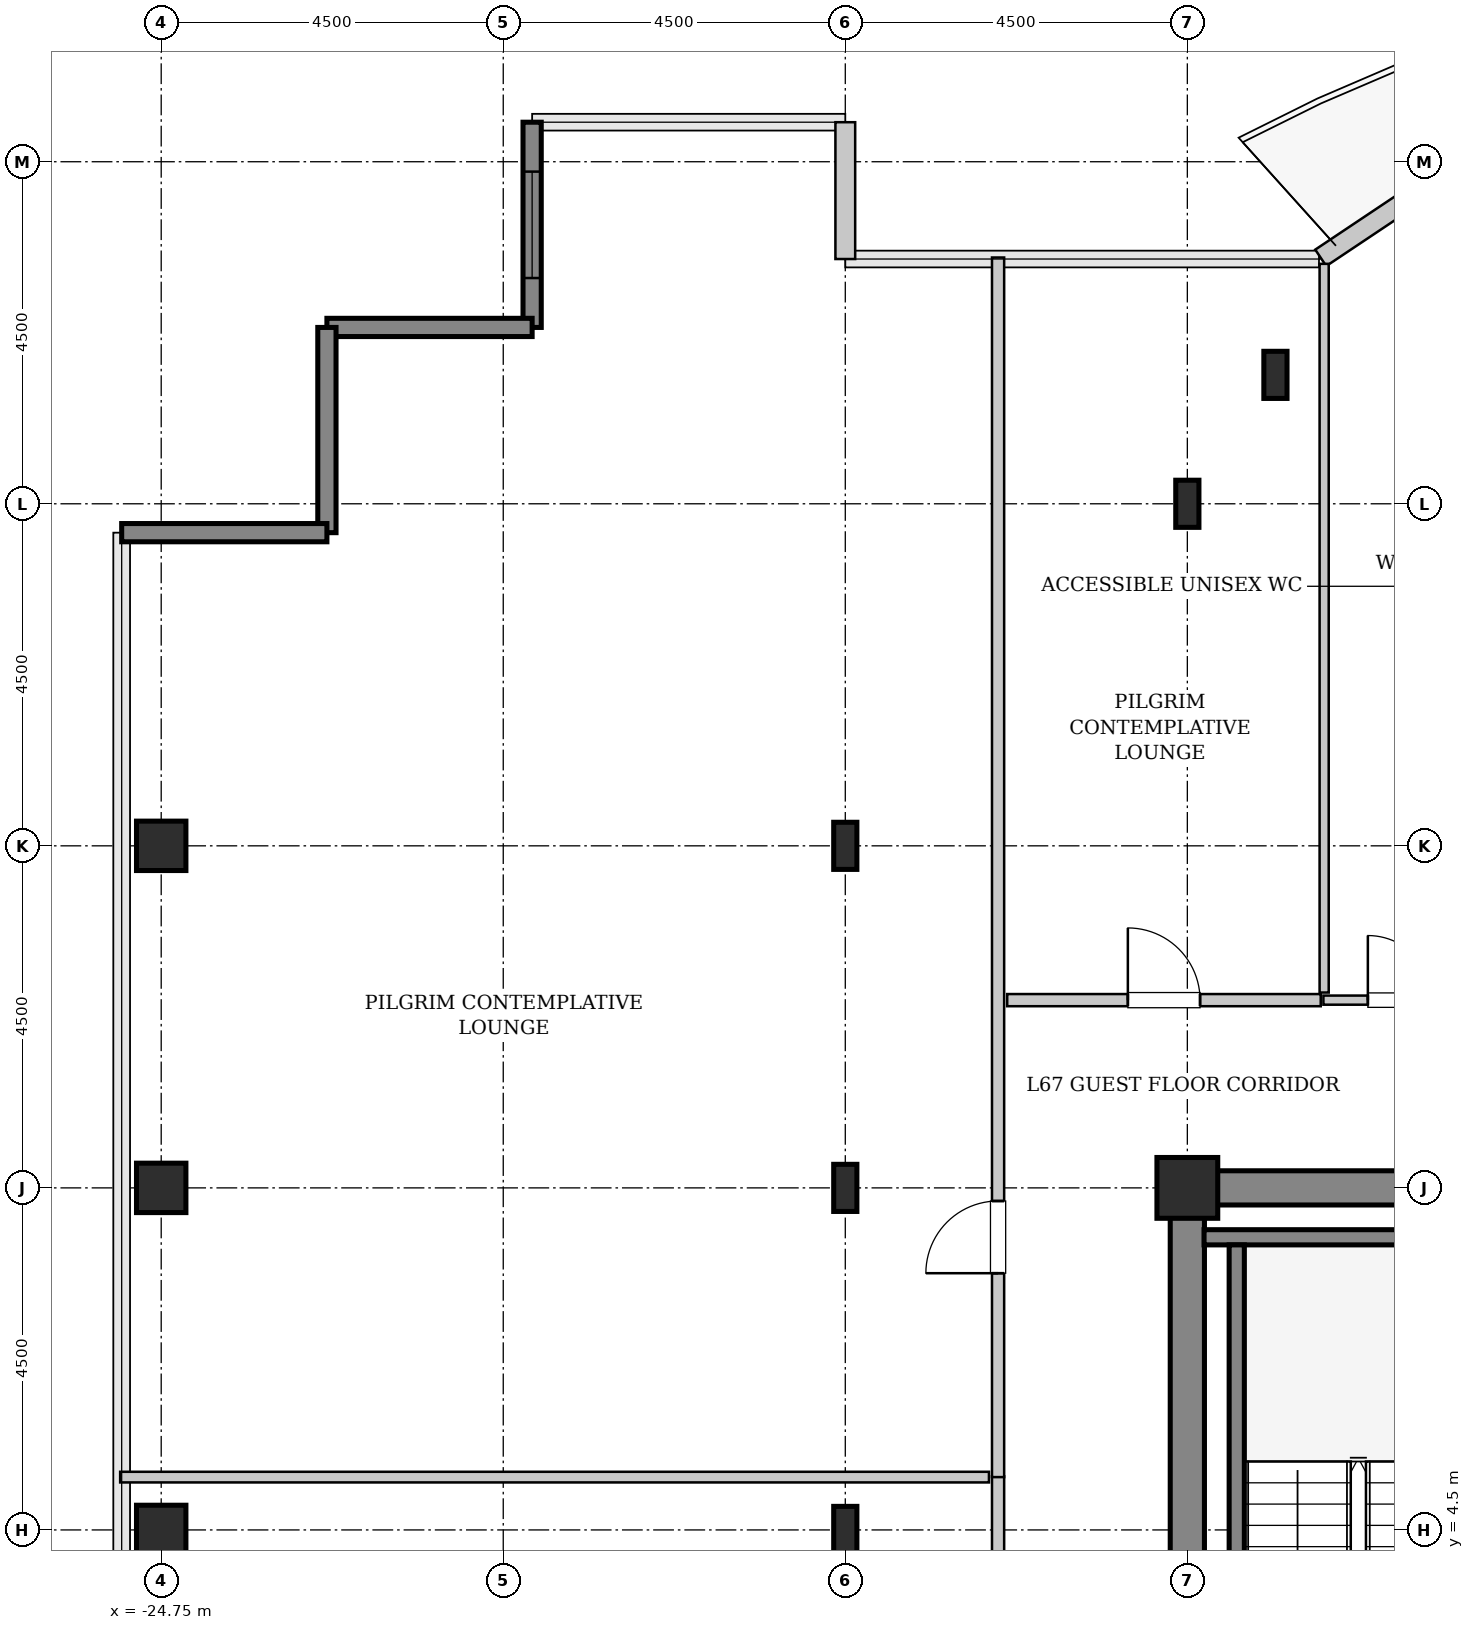
"""IFC4 building model, lengths in metres.
Left out: names, types, materials, properties, quantities, classifications, styles, units other than length and angle.
Written with IfcOpenShell. Run it as: python <this file> out.ifc"""

import sys

from ifc_helpers import new_model, si_unit, direction, frame, frame_2d, origin, origin_2d, place, context, subcontext, project, spatial, rectangle, hollow_rectangle, i_section, extrude, source, transform, mapped, element, fill, save


model = new_model("IFC4")
c1 = context("Model", 3, precision=1e-05, world=origin(), true_north=direction((0.0, 1.0)))
c2 = subcontext(c1, "Body", "Model", "MODEL_VIEW")
j1 = project(units=[si_unit("LENGTHUNIT", "METRE"), si_unit("PLANEANGLEUNIT", "RADIAN")], contexts=[c1])
p1 = place(None, origin())
s1 = spatial("IfcSite", under=j1, at=p1, CompositionType="ELEMENT")
p2 = place(p1, origin())
s2 = spatial("IfcBuilding", under=s1, at=p2, CompositionType="ELEMENT")
p3 = place(p2, frame((0.0, 0.0, 268.4)))
s3 = spatial("IfcBuildingStorey", under=s2, at=p3, CompositionType="ELEMENT", Elevation=268.4)
m1 = source(origin(), c2, "Body", "SweptSolid", [
    extrude(rectangle(XDim=9.925, YDim=0.45, at=frame_2d((4.962, 0.0))), origin(), (0.0, 0.0, 1.0), 3.8),
])
p4 = place(p3, frame((-11.475, 9.0, 0.0), z_axis=(0.0, 0.0, 1.0), x_axis=(1.0, 0.0, 0.0)))
e1 = element("IfcWall", 1, at=p4, inside=s3, PredefinedType="SHEAR", context=c2, shape_type="MappedRepresentation", body=[
    mapped(m1, transform((0.0, 0.0, 0.0), x_axis=(1.0, 0.0, 0.0), y_axis=(0.0, 1.0, 0.0), z_axis=(0.0, 0.0, 1.0), scale=1.0)),
])
m2 = source(origin(), c2, "Body", "SweptSolid", [
    extrude(rectangle(XDim=7.425, YDim=0.45, at=frame_2d((3.712, 0.0))), origin(), (0.0, 0.0, 1.0), 3.8),
])
p5 = place(p3, frame((-11.25, 1.35, 0.0), z_axis=(0.0, 0.0, 1.0), x_axis=(0.0, 1.0, 0.0)))
e2 = element("IfcWall", 2, at=p5, inside=s3, PredefinedType="SHEAR", context=c2, shape_type="MappedRepresentation", body=[
    mapped(m2, transform((0.0, 0.0, 0.0), x_axis=(1.0, 0.0, 0.0), y_axis=(0.0, 1.0, 0.0), z_axis=(0.0, 0.0, 1.0), scale=1.0)),
])
m3 = source(origin(), c2, "Body", "SweptSolid", [
    extrude(hollow_rectangle(XDim=0.65, YDim=0.65, WallThickness=0.032, InnerFilletRadius=0.032, OuterFilletRadius=0.064, at=origin_2d()), origin(), (0.0, 0.0, 1.0), 3.8),
])
for number, where, z_axis, x_axis in (
    (3, (-24.75, 4.5, 0.0), (0.0, 0.0, 1.0), (1.0, 0.0, 0.0)),
    (4, (-24.75, 9.0, 0.0), (0.0, 0.0, 1.0), (1.0, 0.0, 0.0)),
    (5, (-24.75, 13.5, 0.0), (0.0, 0.0, 1.0), (1.0, 0.0, 0.0)),
):
    element("IfcColumn", number, at=place(p3, frame(where, z_axis=z_axis, x_axis=x_axis)), inside=s3, PredefinedType="COLUMN", context=c2, shape_type="MappedRepresentation", body=[
        mapped(m3, transform((0.0, 0.0, 0.0), x_axis=(1.0, 0.0, 0.0), y_axis=(0.0, 1.0, 0.0), z_axis=(0.0, 0.0, 1.0), scale=1.0)),
    ])
m4 = source(origin(), c2, "Body", "SweptSolid", [
    extrude(i_section(OverallWidth=0.305, OverallDepth=0.62, WebThickness=0.021, FlangeThickness=0.04, FilletRadius=0.027, at=origin_2d()), origin(), (0.0, 0.0, 1.0), 3.8),
])
for number, where, z_axis, x_axis in (
    (6, (-15.75, 4.5, 0.0), (0.0, 0.0, 1.0), (1.0, 0.0, 0.0)),
    (7, (-15.75, 9.0, 0.0), (0.0, 0.0, 1.0), (1.0, 0.0, 0.0)),
    (8, (-15.75, 13.5, 0.0), (0.0, 0.0, 1.0), (1.0, 0.0, 0.0)),
):
    element("IfcColumn", number, at=place(p3, frame(where, z_axis=z_axis, x_axis=x_axis)), inside=s3, PredefinedType="COLUMN", context=c2, shape_type="MappedRepresentation", body=[
        mapped(m4, transform((0.0, 0.0, 0.0), x_axis=(1.0, 0.0, 0.0), y_axis=(0.0, 1.0, 0.0), z_axis=(0.0, 0.0, 1.0), scale=1.0)),
    ])
m5 = source(origin(), c2, "Body", "SweptSolid", [
    extrude(hollow_rectangle(XDim=0.8, YDim=0.8, WallThickness=0.04, InnerFilletRadius=0.04, OuterFilletRadius=0.08, at=origin_2d()), origin(), (0.0, 0.0, 1.0), 3.8),
])
p6 = place(p3, frame((-11.25, 9.0, 0.0), z_axis=(0.0, 0.0, 1.0), x_axis=(1.0, 0.0, 0.0)))
e9 = element("IfcColumn", 9, at=p6, inside=s3, PredefinedType="COLUMN", context=c2, shape_type="MappedRepresentation", body=[
    mapped(m5, transform((0.0, 0.0, 0.0), x_axis=(1.0, 0.0, 0.0), y_axis=(0.0, 1.0, 0.0), z_axis=(0.0, 0.0, 1.0), scale=1.0)),
])
for number, where, z_axis, x_axis in (
    (10, (-11.25, 18.0, 0.0), (0.0, 0.0, 1.0), (1.0, 0.0, 0.0)),
    (11, (-10.091, 19.696, 0.0), (0.0, 0.0, 1.0), (1.0, 0.0, 0.0)),
):
    element("IfcColumn", number, at=place(p3, frame(where, z_axis=z_axis, x_axis=x_axis)), inside=s3, PredefinedType="COLUMN", context=c2, shape_type="MappedRepresentation", body=[
        mapped(m4, transform((0.0, 0.0, 0.0), x_axis=(1.0, 0.0, 0.0), y_axis=(0.0, 1.0, 0.0), z_axis=(0.0, 0.0, 1.0), scale=1.0)),
    ])
m6 = source(origin(), c2, "Body", "SweptSolid", [
    extrude(rectangle(XDim=1.469, YDim=0.26, at=frame_2d((0.734, 0.0))), origin(), (0.0, 0.0, 1.0), 3.55),
])
p7 = place(p3, frame((-8.273, 22.052, 0.0), z_axis=(0.0, 0.0, 1.0), x_axis=(-0.831461760506, -0.555581983884, 0.0)))
e12 = element("IfcWall", 12, at=p7, inside=s3, PredefinedType="SOLIDWALL", context=c2, shape_type="MappedRepresentation", body=[
    mapped(m6, transform((0.0, 0.0, 0.0), x_axis=(1.0, 0.0, 0.0), y_axis=(0.0, 1.0, 0.0), z_axis=(0.0, 0.0, 1.0), scale=1.0)),
])
m7 = source(origin(), c2, "Body", "SweptSolid", [
    extrude(rectangle(XDim=1.8, YDim=0.26, at=frame_2d((0.9, 0.0))), origin(), (0.0, 0.0, 1.0), 3.55),
])
p8 = place(p3, frame((-15.75, 21.22, 0.0), z_axis=(0.0, 0.0, 1.0), x_axis=(0.0, 1.0, 0.0)))
e13 = element("IfcWall", 13, at=p8, inside=s3, PredefinedType="SOLIDWALL", context=c2, shape_type="MappedRepresentation", body=[
    mapped(m7, transform((0.0, 0.0, 0.0), x_axis=(1.0, 0.0, 0.0), y_axis=(0.0, 1.0, 0.0), z_axis=(0.0, 0.0, 1.0), scale=1.0)),
])
m8 = source(origin(), c2, "Body", "SweptSolid", [
    extrude(rectangle(XDim=2.7, YDim=0.24, at=frame_2d((1.35, 0.0))), origin(), (0.0, 0.0, 1.0), 3.55),
])
p9 = place(p3, frame((-19.87, 23.02, 0.0), z_axis=(0.0, 0.0, 1.0), x_axis=(0.0, -1.0, 0.0)))
e14 = element("IfcWall", 14, at=p9, inside=s3, PredefinedType="SHEAR", context=c2, shape_type="MappedRepresentation", body=[
    mapped(m8, transform((0.0, 0.0, 0.0), x_axis=(1.0, 0.0, 0.0), y_axis=(0.0, 1.0, 0.0), z_axis=(0.0, 0.0, 1.0), scale=1.0)),
])
p10 = place(p9, frame((0.65, 0.0, 0.85)))
e15 = element("IfcOpeningElement", 15, at=p10, cuts=e14, PredefinedType="OPENING", context=c2, shape_type="SweptSolid", body=[
    extrude(rectangle(XDim=1.4, YDim=1.8, at=frame_2d((0.7, 0.9))), frame((0.0, 0.13, 0.0), z_axis=(0.0, -1.0, 0.0), x_axis=(1.0, 0.0, 0.0)), (0.0, 0.0, 1.0), 0.26),
])
for number, where, z_axis, x_axis in (
    (16, (-19.87, 20.32, 0.0), (0.0, 0.0, 1.0), (-1.0, 0.0, 0.0)),
    (17, (-22.57, 20.32, 0.0), (0.0, 0.0, 1.0), (0.0, -1.0, 0.0)),
    (18, (-22.57, 17.62, 0.0), (0.0, 0.0, 1.0), (-1.0, 0.0, 0.0)),
):
    element("IfcWall", number, at=place(p3, frame(where, z_axis=z_axis, x_axis=x_axis)), inside=s3, PredefinedType="SHEAR", context=c2, shape_type="MappedRepresentation", body=[
        mapped(m8, transform((0.0, 0.0, 0.0), x_axis=(1.0, 0.0, 0.0), y_axis=(0.0, 1.0, 0.0), z_axis=(0.0, 0.0, 1.0), scale=1.0)),
    ])
m9 = source(origin(), c2, "Body", "SweptSolid", [
    extrude(rectangle(XDim=3.73, YDim=0.2, at=frame_2d((1.865, 0.0))), origin(), (0.0, 0.0, 1.0), 3.8),
])
p11 = place(p3, frame((-7.3, 8.35, 0.0), z_axis=(0.0, 0.0, 1.0), x_axis=(-1.0, 0.0, 0.0)))
e19 = element("IfcWall", 19, at=p11, inside=s3, PredefinedType="SOLIDWALL", context=c2, shape_type="MappedRepresentation", body=[
    mapped(m9, transform((0.0, 0.0, 0.0), x_axis=(1.0, 0.0, 0.0), y_axis=(0.0, 1.0, 0.0), z_axis=(0.0, 0.0, 1.0), scale=1.0)),
])
m10 = source(origin(), c2, "Body", "SweptSolid", [
    extrude(rectangle(XDim=7.1, YDim=0.2, at=frame_2d((3.55, 0.0))), origin(), (0.0, 0.0, 1.0), 3.8),
])
p12 = place(p3, frame((-10.6, 1.15, 0.0), z_axis=(0.0, 0.0, 1.0), x_axis=(0.0, 1.0, 0.0)))
e20 = element("IfcWall", 20, at=p12, inside=s3, PredefinedType="SOLIDWALL", context=c2, shape_type="MappedRepresentation", body=[
    mapped(m10, transform((0.0, 0.0, 0.0), x_axis=(1.0, 0.0, 0.0), y_axis=(0.0, 1.0, 0.0), z_axis=(0.0, 0.0, 1.0), scale=1.0)),
])
m11 = source(origin(), c2, "Body", "SweptSolid", [
    extrude(rectangle(XDim=2.02, YDim=0.12, at=frame_2d((1.01, 0.0))), origin(), (0.0, 0.0, 1.0), 3.535),
])
p13 = place(p3, frame((-9.46, 11.47, 0.0), z_axis=(0.0, 0.0, 1.0), x_axis=(1.0, 0.0, 0.0)))
e21 = element("IfcWall", 21, at=p13, inside=s3, PredefinedType="PLUMBINGWALL", context=c2, shape_type="MappedRepresentation", body=[
    mapped(m11, transform((0.0, 0.0, 0.0), x_axis=(1.0, 0.0, 0.0), y_axis=(0.0, 1.0, 0.0), z_axis=(0.0, 0.0, 1.0), scale=1.0)),
])
p14 = place(p13, frame((0.585, 0.0, 0.0)))
e22 = element("IfcOpeningElement", 22, at=p14, cuts=e21, PredefinedType="OPENING", context=c2, shape_type="SweptSolid", body=[
    extrude(rectangle(XDim=0.85, YDim=2.1, at=frame_2d((0.425, 1.05))), frame((0.0, 0.07, 0.0), z_axis=(0.0, -1.0, 0.0), x_axis=(1.0, 0.0, 0.0)), (0.0, 0.0, 1.0), 0.14),
])
m12 = source(origin(), c2, "Body", "SweptSolid", [
    extrude(rectangle(XDim=9.587, YDim=0.12, at=frame_2d((4.793, 0.0))), origin(), (0.0, 0.0, 1.0), 3.535),
])
p15 = place(p3, frame((-9.45, 11.57, 0.0), z_axis=(0.0, 0.0, 1.0), x_axis=(0.0, 1.0, 0.0)))
e23 = element("IfcWall", 23, at=p15, inside=s3, PredefinedType="PLUMBINGWALL", context=c2, shape_type="MappedRepresentation", body=[
    mapped(m12, transform((0.0, 0.0, 0.0), x_axis=(1.0, 0.0, 0.0), y_axis=(0.0, 1.0, 0.0), z_axis=(0.0, 0.0, 1.0), scale=1.0)),
])
m13 = source(origin(), c2, "Body", "SweptSolid", [
    extrude(rectangle(XDim=6.705, YDim=0.16, at=frame_2d((3.353, 0.0))), origin(), (0.0, 0.0, 1.0), 3.535),
])
p16 = place(p3, frame((-13.74, -1.5, 0.0), z_axis=(0.0, 0.0, 1.0), x_axis=(0.0, 1.0, 0.0)))
e24 = element("IfcWall", 24, at=p16, inside=s3, PredefinedType="PARTITIONING", context=c2, shape_type="MappedRepresentation", body=[
    mapped(m13, transform((0.0, 0.0, 0.0), x_axis=(1.0, 0.0, 0.0), y_axis=(0.0, 1.0, 0.0), z_axis=(0.0, 0.0, 1.0), scale=1.0)),
])
p17 = place(p16, frame((2.877, 0.0, 0.0)))
e25 = element("IfcOpeningElement", 25, at=p17, cuts=e24, PredefinedType="OPENING", context=c2, shape_type="SweptSolid", body=[
    extrude(rectangle(XDim=0.95, YDim=2.1, at=frame_2d((0.475, 1.05))), frame((0.0, 0.09, 0.0), z_axis=(0.0, -1.0, 0.0), x_axis=(1.0, 0.0, 0.0)), (0.0, 0.0, 1.0), 0.18),
])
m14 = source(origin(), c2, "Body", "SweptSolid", [
    extrude(rectangle(XDim=11.43, YDim=0.14, at=frame_2d((5.715, 0.0))), origin(), (0.0, 0.0, 1.0), 3.535),
])
p18 = place(p3, frame((-25.29, 5.195, 0.0), z_axis=(0.0, 0.0, 1.0), x_axis=(1.0, 0.0, 0.0)))
e26 = element("IfcWall", 26, at=p18, inside=s3, PredefinedType="PARTITIONING", context=c2, shape_type="MappedRepresentation", body=[
    mapped(m14, transform((0.0, 0.0, 0.0), x_axis=(1.0, 0.0, 0.0), y_axis=(0.0, 1.0, 0.0), z_axis=(0.0, 0.0, 1.0), scale=1.0)),
])
m15 = source(origin(), c2, "Body", "SweptSolid", [
    extrude(rectangle(XDim=16.045, YDim=0.16, at=frame_2d((8.022, 0.0))), origin(), (0.0, 0.0, 1.0), 3.535),
])
p19 = place(p3, frame((-13.74, 5.195, 0.0), z_axis=(0.0, 0.0, 1.0), x_axis=(0.0, 1.0, 0.0)))
e27 = element("IfcWall", 27, at=p19, inside=s3, PredefinedType="PARTITIONING", context=c2, shape_type="MappedRepresentation", body=[
    mapped(m15, transform((0.0, 0.0, 0.0), x_axis=(1.0, 0.0, 0.0), y_axis=(0.0, 1.0, 0.0), z_axis=(0.0, 0.0, 1.0), scale=1.0)),
])
p20 = place(p19, frame((2.683, 0.0, 0.0)))
e28 = element("IfcOpeningElement", 28, at=p20, cuts=e27, PredefinedType="OPENING", context=c2, shape_type="SweptSolid", body=[
    extrude(rectangle(XDim=0.95, YDim=2.1, at=frame_2d((0.475, 1.05))), frame((0.0, 0.09, 0.0), z_axis=(0.0, -1.0, 0.0), x_axis=(1.0, 0.0, 0.0)), (0.0, 0.0, 1.0), 0.18),
])
m16 = source(origin(), c2, "Body", "SweptSolid", [
    extrude(rectangle(XDim=4.125, YDim=0.16, at=frame_2d((2.062, 0.0))), origin(), (0.0, 0.0, 1.0), 3.535),
])
p21 = place(p3, frame((-13.62, 11.47, 0.0), z_axis=(0.0, 0.0, 1.0), x_axis=(1.0, 0.0, 0.0)))
e29 = element("IfcWall", 29, at=p21, inside=s3, PredefinedType="PARTITIONING", context=c2, shape_type="MappedRepresentation", body=[
    mapped(m16, transform((0.0, 0.0, 0.0), x_axis=(1.0, 0.0, 0.0), y_axis=(0.0, 1.0, 0.0), z_axis=(0.0, 0.0, 1.0), scale=1.0)),
])
p22 = place(p21, frame((1.587, 0.0, 0.0)))
e30 = element("IfcOpeningElement", 30, at=p22, cuts=e29, PredefinedType="OPENING", context=c2, shape_type="SweptSolid", body=[
    extrude(rectangle(XDim=0.95, YDim=2.1, at=frame_2d((0.475, 1.05))), frame((0.0, 0.09, 0.0), z_axis=(0.0, -1.0, 0.0), x_axis=(1.0, 0.0, 0.0)), (0.0, 0.0, 1.0), 0.18),
])
m17 = source(origin(), c2, "Body", "SweptSolid", [
    extrude(rectangle(XDim=1.4, YDim=1.8, at=frame_2d((0.7, 0.9))), frame((0.0, 0.03, 0.0), z_axis=(0.0, -1.0, 0.0), x_axis=(1.0, 0.0, 0.0)), (0.0, 0.0, 1.0), 0.06),
])
p23 = place(p10, origin())
e31 = element("IfcWindow", 31, at=p23, inside=s3, PartitioningType="SINGLE_PANEL", PredefinedType="WINDOW", context=c2, shape_type="MappedRepresentation", body=[
    mapped(m17, transform((0.0, 0.0, 0.0), x_axis=(1.0, 0.0, 0.0), y_axis=(0.0, 1.0, 0.0), z_axis=(0.0, 0.0, 1.0), scale=1.0)),
])
fill(e15, e31)
m18 = source(origin(), c2, "Body", "SweptSolid", [
    extrude(rectangle(XDim=0.85, YDim=2.1, at=frame_2d((0.425, 1.05))), frame((0.0, 0.025, 0.0), z_axis=(0.0, -1.0, 0.0), x_axis=(1.0, 0.0, 0.0)), (0.0, 0.0, 1.0), 0.05),
])
p24 = place(p14, origin())
e32 = element("IfcDoor", 32, at=p24, inside=s3, OperationType="SINGLE_SWING_LEFT", PredefinedType="DOOR", context=c2, shape_type="MappedRepresentation", body=[
    mapped(m18, transform((0.0, 0.0, 0.0), x_axis=(1.0, 0.0, 0.0), y_axis=(0.0, 1.0, 0.0), z_axis=(0.0, 0.0, 1.0), scale=1.0)),
])
fill(e22, e32)
m19 = source(origin(), c2, "Body", "SweptSolid", [
    extrude(rectangle(XDim=0.95, YDim=2.1, at=frame_2d((0.475, 1.05))), frame((0.0, 0.025, 0.0), z_axis=(0.0, -1.0, 0.0), x_axis=(1.0, 0.0, 0.0)), (0.0, 0.0, 1.0), 0.05),
])
p25 = place(p20, origin())
e33 = element("IfcDoor", 33, at=p25, inside=s3, OperationType="SINGLE_SWING_LEFT", PredefinedType="DOOR", context=c2, shape_type="MappedRepresentation", body=[
    mapped(m19, transform((0.0, 0.0, 0.0), x_axis=(1.0, 0.0, 0.0), y_axis=(0.0, 1.0, 0.0), z_axis=(0.0, 0.0, 1.0), scale=1.0)),
])
fill(e28, e33)
p26 = place(p22, origin())
e34 = element("IfcDoor", 34, at=p26, inside=s3, OperationType="SINGLE_SWING_LEFT", PredefinedType="DOOR", context=c2, shape_type="MappedRepresentation", body=[
    mapped(m19, transform((0.0, 0.0, 0.0), x_axis=(1.0, 0.0, 0.0), y_axis=(0.0, 1.0, 0.0), z_axis=(0.0, 0.0, 1.0), scale=1.0)),
])
fill(e30, e34)
save(model, sys.argv[1])
